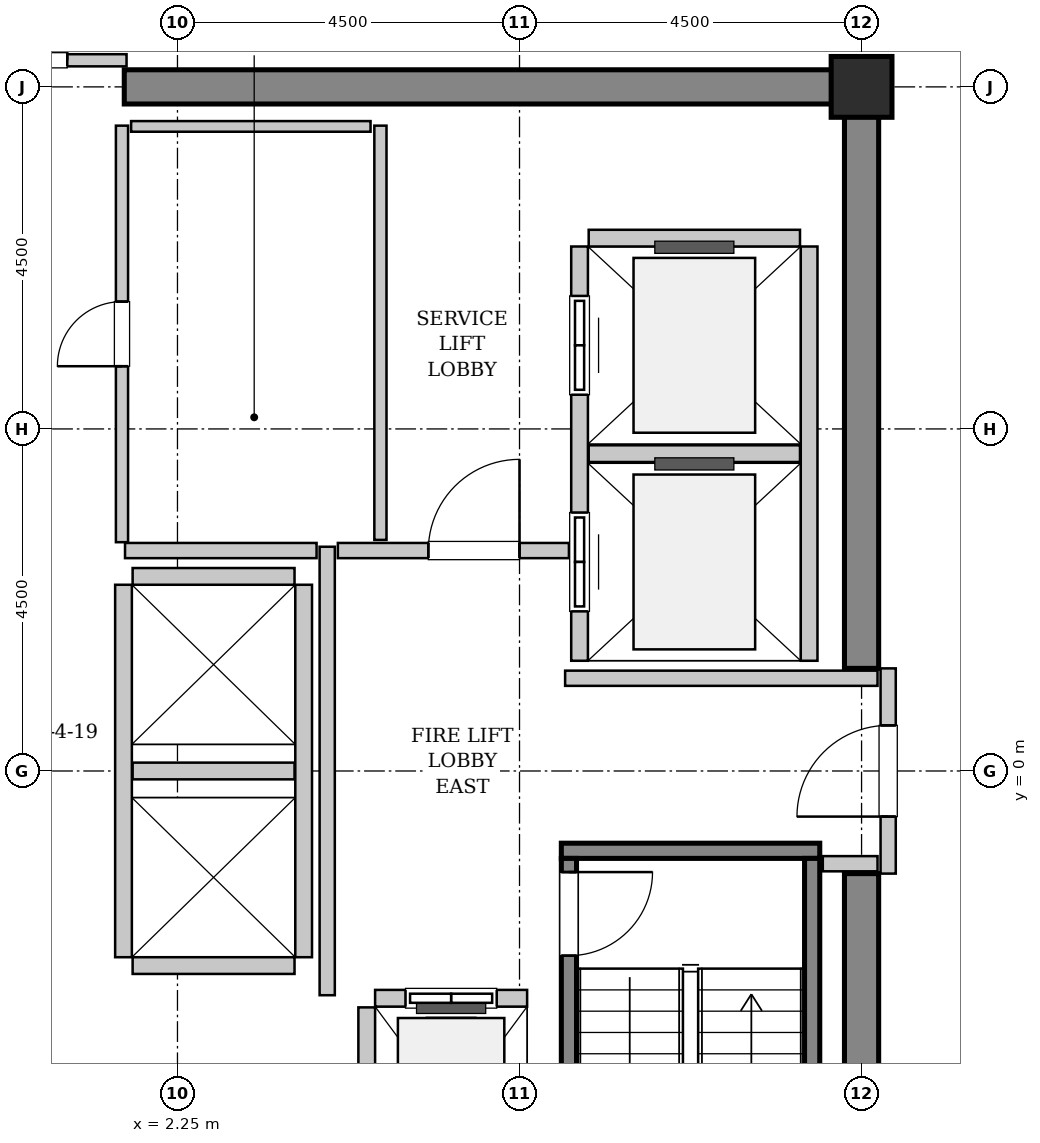
"""IFC4 building model, lengths in metres.
Left out: names, types, materials, properties, quantities, classifications, styles, units other than length and angle.
Written with IfcOpenShell. Run it as: python <this file> out.ifc"""

import sys

from ifc_helpers import new_model, si_unit, direction, frame, frame_2d, origin, origin_2d, place, context, subcontext, project, spatial, rectangle, hollow_rectangle, extrude, source, transform, mapped, element, fill, save


model = new_model("IFC4")
c1 = context("Model", 3, precision=1e-05, world=origin(), true_north=direction((0.0, 1.0)))
c2 = subcontext(c1, "Body", "Model", "MODEL_VIEW")
j1 = project(units=[si_unit("LENGTHUNIT", "METRE"), si_unit("PLANEANGLEUNIT", "RADIAN")], contexts=[c1])
p1 = place(None, origin())
s1 = spatial("IfcSite", under=j1, at=p1, CompositionType="ELEMENT")
p2 = place(p1, origin())
s2 = spatial("IfcBuilding", under=s1, at=p2, CompositionType="ELEMENT")
p3 = place(p2, frame((0.0, 0.0, 210.4)))
s3 = spatial("IfcBuildingStorey", under=s2, at=p3, CompositionType="ELEMENT", Elevation=210.4)
m1 = source(origin(), c2, "Body", "SweptSolid", [
    extrude(rectangle(XDim=9.925, YDim=0.45, at=frame_2d((4.962, 0.0))), origin(), (0.0, 0.0, 1.0), 3.8),
])
p4 = place(p3, frame((1.55, 9.0, 0.0), z_axis=(0.0, 0.0, 1.0), x_axis=(1.0, 0.0, 0.0)))
e1 = element("IfcWall", 1, at=p4, inside=s3, PredefinedType="SHEAR", context=c2, shape_type="MappedRepresentation", body=[
    mapped(m1, transform((0.0, 0.0, 0.0), x_axis=(1.0, 0.0, 0.0), y_axis=(0.0, 1.0, 0.0), z_axis=(0.0, 0.0, 1.0), scale=1.0)),
])
m2 = source(origin(), c2, "Body", "SweptSolid", [
    extrude(rectangle(XDim=7.425, YDim=0.45, at=frame_2d((3.712, 0.0))), origin(), (0.0, 0.0, 1.0), 3.8),
])
for number, where, z_axis, x_axis in (
    (2, (11.25, -8.775, 0.0), (0.0, 0.0, 1.0), (0.0, 1.0, 0.0)),
    (3, (11.25, 1.35, 0.0), (0.0, 0.0, 1.0), (0.0, 1.0, 0.0)),
):
    element("IfcWall", number, at=place(p3, frame(where, z_axis=z_axis, x_axis=x_axis)), inside=s3, PredefinedType="SHEAR", context=c2, shape_type="MappedRepresentation", body=[
        mapped(m2, transform((0.0, 0.0, 0.0), x_axis=(1.0, 0.0, 0.0), y_axis=(0.0, 1.0, 0.0), z_axis=(0.0, 0.0, 1.0), scale=1.0)),
    ])
m3 = source(origin(), c2, "Body", "SweptSolid", [
    extrude(hollow_rectangle(XDim=0.8, YDim=0.8, WallThickness=0.04, InnerFilletRadius=0.04, OuterFilletRadius=0.08, at=origin_2d()), origin(), (0.0, 0.0, 1.0), 3.8),
])
p5 = place(p3, frame((11.25, 9.0, 0.0), z_axis=(0.0, 0.0, 1.0), x_axis=(1.0, 0.0, 0.0)))
e4 = element("IfcColumn", 4, at=p5, inside=s3, PredefinedType="COLUMN", context=c2, shape_type="MappedRepresentation", body=[
    mapped(m3, transform((0.0, 0.0, 0.0), x_axis=(1.0, 0.0, 0.0), y_axis=(0.0, 1.0, 0.0), z_axis=(0.0, 0.0, 1.0), scale=1.0)),
])
m4 = source(origin(), c2, "Body", "SweptSolid", [
    extrude(rectangle(XDim=3.4, YDim=0.2, at=frame_2d((1.7, 0.0))), origin(), (0.0, 0.0, 1.0), 3.8),
])
p6 = place(p3, frame((7.3, -1.05, 0.0), z_axis=(0.0, 0.0, 1.0), x_axis=(1.0, 0.0, 0.0)))
e5 = element("IfcWall", 5, at=p6, inside=s3, PredefinedType="SOLIDWALL", context=c2, shape_type="MappedRepresentation", body=[
    mapped(m4, transform((0.0, 0.0, 0.0), x_axis=(1.0, 0.0, 0.0), y_axis=(0.0, 1.0, 0.0), z_axis=(0.0, 0.0, 1.0), scale=1.0)),
])
m5 = source(origin(), c2, "Body", "SweptSolid", [
    extrude(rectangle(XDim=7.1, YDim=0.2, at=frame_2d((3.55, 0.0))), origin(), (0.0, 0.0, 1.0), 3.8),
])
p7 = place(p3, frame((7.4, -1.15, 0.0), z_axis=(0.0, 0.0, 1.0), x_axis=(0.0, -1.0, 0.0)))
e6 = element("IfcWall", 6, at=p7, inside=s3, PredefinedType="SOLIDWALL", context=c2, shape_type="MappedRepresentation", body=[
    mapped(m5, transform((0.0, 0.0, 0.0), x_axis=(1.0, 0.0, 0.0), y_axis=(0.0, 1.0, 0.0), z_axis=(0.0, 0.0, 1.0), scale=1.0)),
])
p8 = place(p7, frame((0.18, 0.0, 0.0)))
e7 = element("IfcOpeningElement", 7, at=p8, cuts=e6, PredefinedType="OPENING", context=c2, shape_type="SweptSolid", body=[
    extrude(rectangle(XDim=1.1, YDim=2.15, at=frame_2d((0.55, 1.075))), frame((0.0, 0.11, 0.0), z_axis=(0.0, -1.0, 0.0), x_axis=(1.0, 0.0, 0.0)), (0.0, 0.0, 1.0), 0.22),
])
p9 = place(p3, frame((10.6, -1.15, 0.0), z_axis=(0.0, 0.0, 1.0), x_axis=(0.0, -1.0, 0.0)))
e8 = element("IfcWall", 8, at=p9, inside=s3, PredefinedType="SOLIDWALL", context=c2, shape_type="MappedRepresentation", body=[
    mapped(m5, transform((0.0, 0.0, 0.0), x_axis=(1.0, 0.0, 0.0), y_axis=(0.0, 1.0, 0.0), z_axis=(0.0, 0.0, 1.0), scale=1.0)),
])
m6 = source(origin(), c2, "Body", "SweptSolid", [
    extrude(rectangle(XDim=2.0, YDim=0.22, at=frame_2d((1.0, 0.0))), origin(), (0.0, 0.0, 1.0), 3.535),
])
p10 = place(p3, frame((6.85, -2.99, 0.0), z_axis=(0.0, 0.0, 1.0), x_axis=(-1.0, 0.0, 0.0)))
e9 = element("IfcWall", 9, at=p10, inside=s3, PredefinedType="SOLIDWALL", context=c2, shape_type="MappedRepresentation", body=[
    mapped(m6, transform((0.0, 0.0, 0.0), x_axis=(1.0, 0.0, 0.0), y_axis=(0.0, 1.0, 0.0), z_axis=(0.0, 0.0, 1.0), scale=1.0)),
])
p11 = place(p10, frame((0.4, 0.0, 0.0)))
e10 = element("IfcOpeningElement", 10, at=p11, cuts=e9, PredefinedType="OPENING", context=c2, shape_type="SweptSolid", body=[
    extrude(rectangle(XDim=1.2, YDim=2.2, at=frame_2d((0.6, 1.1))), frame((0.0, 0.12, 0.0), z_axis=(0.0, -1.0, 0.0), x_axis=(1.0, 0.0, 0.0)), (0.0, 0.0, 1.0), 0.24),
])
m7 = source(origin(), c2, "Body", "SweptSolid", [
    extrude(rectangle(XDim=2.68, YDim=0.22, at=frame_2d((1.34, 0.0))), origin(), (0.0, 0.0, 1.0), 3.535),
])
p12 = place(p3, frame((4.74, -3.11, 0.0), z_axis=(0.0, 0.0, 1.0), x_axis=(0.0, -1.0, 0.0)))
e11 = element("IfcWall", 11, at=p12, inside=s3, PredefinedType="SOLIDWALL", context=c2, shape_type="MappedRepresentation", body=[
    mapped(m7, transform((0.0, 0.0, 0.0), x_axis=(1.0, 0.0, 0.0), y_axis=(0.0, 1.0, 0.0), z_axis=(0.0, 0.0, 1.0), scale=1.0)),
])
m8 = source(origin(), c2, "Body", "SweptSolid", [
    extrude(rectangle(XDim=5.45, YDim=0.22, at=frame_2d((2.725, 0.0))), origin(), (0.0, 0.0, 1.0), 3.535),
])
p13 = place(p3, frame((7.54, 6.9, 0.0), z_axis=(0.0, 0.0, 1.0), x_axis=(0.0, -1.0, 0.0)))
e12 = element("IfcWall", 12, at=p13, inside=s3, PredefinedType="SOLIDWALL", context=c2, shape_type="MappedRepresentation", body=[
    mapped(m8, transform((0.0, 0.0, 0.0), x_axis=(1.0, 0.0, 0.0), y_axis=(0.0, 1.0, 0.0), z_axis=(0.0, 0.0, 1.0), scale=1.0)),
])
p14 = place(p13, frame((3.5, 0.0, 0.0)))
e13 = element("IfcOpeningElement", 13, at=p14, cuts=e12, PredefinedType="OPENING", context=c2, shape_type="SweptSolid", body=[
    extrude(rectangle(XDim=1.3, YDim=2.3, at=frame_2d((0.65, 1.15))), frame((0.0, 0.12, 0.0), z_axis=(0.0, -1.0, 0.0), x_axis=(1.0, 0.0, 0.0)), (0.0, 0.0, 1.0), 0.24),
])
p15 = place(p13, frame((0.65, 0.0, 0.0)))
e14 = element("IfcOpeningElement", 14, at=p15, cuts=e12, PredefinedType="OPENING", context=c2, shape_type="SweptSolid", body=[
    extrude(rectangle(XDim=1.3, YDim=2.3, at=frame_2d((0.65, 1.15))), frame((0.0, 0.12, 0.0), z_axis=(0.0, -1.0, 0.0), x_axis=(1.0, 0.0, 0.0)), (0.0, 0.0, 1.0), 0.24),
])
p16 = place(p3, frame((10.56, 1.45, 0.0), z_axis=(0.0, 0.0, 1.0), x_axis=(0.0, 1.0, 0.0)))
e15 = element("IfcWall", 15, at=p16, inside=s3, PredefinedType="SOLIDWALL", context=c2, shape_type="MappedRepresentation", body=[
    mapped(m8, transform((0.0, 0.0, 0.0), x_axis=(1.0, 0.0, 0.0), y_axis=(0.0, 1.0, 0.0), z_axis=(0.0, 0.0, 1.0), scale=1.0)),
])
m9 = source(origin(), c2, "Body", "SweptSolid", [
    extrude(rectangle(XDim=2.78, YDim=0.22, at=frame_2d((1.39, 0.0))), origin(), (0.0, 0.0, 1.0), 3.535),
])
for number, where, z_axis, x_axis in (
    (16, (7.66, 4.175, 0.0), (0.0, 0.0, 1.0), (1.0, 0.0, 0.0)),
    (17, (10.44, 7.01, 0.0), (0.0, 0.0, 1.0), (-1.0, 0.0, 0.0)),
):
    element("IfcWall", number, at=place(p3, frame(where, z_axis=z_axis, x_axis=x_axis)), inside=s3, PredefinedType="SOLIDWALL", context=c2, shape_type="MappedRepresentation", body=[
        mapped(m9, transform((0.0, 0.0, 0.0), x_axis=(1.0, 0.0, 0.0), y_axis=(0.0, 1.0, 0.0), z_axis=(0.0, 0.0, 1.0), scale=1.0)),
    ])
m10 = source(origin(), c2, "Body", "SweptSolid", [
    extrude(rectangle(XDim=4.9, YDim=0.22, at=frame_2d((2.45, 0.0))), origin(), (0.0, 0.0, 1.0), 3.535),
])
for number, where, z_axis, x_axis in (
    (18, (1.54, 2.45, 0.0), (0.0, 0.0, 1.0), (0.0, -1.0, 0.0)),
    (19, (3.91, -2.45, 0.0), (0.0, 0.0, 1.0), (0.0, 1.0, 0.0)),
):
    element("IfcWall", number, at=place(p3, frame(where, z_axis=z_axis, x_axis=x_axis)), inside=s3, PredefinedType="SOLIDWALL", context=c2, shape_type="MappedRepresentation", body=[
        mapped(m10, transform((0.0, 0.0, 0.0), x_axis=(1.0, 0.0, 0.0), y_axis=(0.0, 1.0, 0.0), z_axis=(0.0, 0.0, 1.0), scale=1.0)),
    ])
m11 = source(origin(), c2, "Body", "SweptSolid", [
    extrude(rectangle(XDim=2.13, YDim=0.22, at=frame_2d((1.065, 0.0))), origin(), (0.0, 0.0, 1.0), 3.535),
])
for number, where, z_axis, x_axis in (
    (20, (1.66, -2.56, 0.0), (0.0, 0.0, 1.0), (1.0, 0.0, 0.0)),
    (21, (1.66, 0.0, 0.0), (0.0, 0.0, 1.0), (1.0, 0.0, 0.0)),
    (22, (3.79, 2.56, 0.0), (0.0, 0.0, 1.0), (-1.0, 0.0, 0.0)),
):
    element("IfcWall", number, at=place(p3, frame(where, z_axis=z_axis, x_axis=x_axis)), inside=s3, PredefinedType="SOLIDWALL", context=c2, shape_type="MappedRepresentation", body=[
        mapped(m11, transform((0.0, 0.0, 0.0), x_axis=(1.0, 0.0, 0.0), y_axis=(0.0, 1.0, 0.0), z_axis=(0.0, 0.0, 1.0), scale=1.0)),
    ])
m12 = source(origin(), c2, "Body", "SweptSolid", [
    extrude(rectangle(XDim=2.7, YDim=0.2, at=frame_2d((1.35, 0.0))), origin(), (0.0, 0.0, 1.0), 2.625),
])
p17 = place(p3, frame((11.6, -1.35, 0.0), z_axis=(0.0, 0.0, 1.0), x_axis=(0.0, 1.0, 0.0)))
e23 = element("IfcWall", 23, at=p17, inside=s3, PredefinedType="PARTITIONING", context=c2, shape_type="MappedRepresentation", body=[
    mapped(m12, transform((0.0, 0.0, 0.0), x_axis=(1.0, 0.0, 0.0), y_axis=(0.0, 1.0, 0.0), z_axis=(0.0, 0.0, 1.0), scale=1.0)),
])
p18 = place(p17, frame((0.75, 0.0, 0.0)))
e24 = element("IfcOpeningElement", 24, at=p18, cuts=e23, PredefinedType="OPENING", context=c2, shape_type="SweptSolid", body=[
    extrude(rectangle(XDim=1.2, YDim=2.15, at=frame_2d((0.6, 1.075))), frame((0.0, 0.11, 0.0), z_axis=(0.0, -1.0, 0.0), x_axis=(1.0, 0.0, 0.0)), (0.0, 0.0, 1.0), 0.22),
])
m13 = source(origin(), c2, "Body", "SweptSolid", [
    extrude(rectangle(XDim=5.9, YDim=0.2, at=frame_2d((2.95, 0.0))), origin(), (0.0, 0.0, 1.0), 3.535),
])
p19 = place(p3, frame((4.22, -2.95, 0.0), z_axis=(0.0, 0.0, 1.0), x_axis=(0.0, 1.0, 0.0)))
e25 = element("IfcWall", 25, at=p19, inside=s3, PredefinedType="PARTITIONING", context=c2, shape_type="MappedRepresentation", body=[
    mapped(m13, transform((0.0, 0.0, 0.0), x_axis=(1.0, 0.0, 0.0), y_axis=(0.0, 1.0, 0.0), z_axis=(0.0, 0.0, 1.0), scale=1.0)),
])
m14 = source(origin(), c2, "Body", "SweptSolid", [
    extrude(rectangle(XDim=2.52, YDim=0.2, at=frame_2d((1.26, 0.0))), origin(), (0.0, 0.0, 1.0), 3.535),
])
p20 = place(p3, frame((1.56, 2.9, 0.0), z_axis=(0.0, 0.0, 1.0), x_axis=(1.0, 0.0, 0.0)))
e26 = element("IfcWall", 26, at=p20, inside=s3, PredefinedType="PARTITIONING", context=c2, shape_type="MappedRepresentation", body=[
    mapped(m14, transform((0.0, 0.0, 0.0), x_axis=(1.0, 0.0, 0.0), y_axis=(0.0, 1.0, 0.0), z_axis=(0.0, 0.0, 1.0), scale=1.0)),
])
m15 = source(origin(), c2, "Body", "SweptSolid", [
    extrude(rectangle(XDim=3.04, YDim=0.2, at=frame_2d((1.52, 0.0))), origin(), (0.0, 0.0, 1.0), 3.535),
])
p21 = place(p3, frame((4.36, 2.9, 0.0), z_axis=(0.0, 0.0, 1.0), x_axis=(1.0, 0.0, 0.0)))
e27 = element("IfcWall", 27, at=p21, inside=s3, PredefinedType="PARTITIONING", context=c2, shape_type="MappedRepresentation", body=[
    mapped(m15, transform((0.0, 0.0, 0.0), x_axis=(1.0, 0.0, 0.0), y_axis=(0.0, 1.0, 0.0), z_axis=(0.0, 0.0, 1.0), scale=1.0)),
])
p22 = place(p21, frame((1.19, 0.0, 0.0)))
e28 = element("IfcOpeningElement", 28, at=p22, cuts=e27, PredefinedType="OPENING", context=c2, shape_type="SweptSolid", body=[
    extrude(rectangle(XDim=1.2, YDim=2.15, at=frame_2d((0.6, 1.075))), frame((0.0, 0.11, 0.0), z_axis=(0.0, -1.0, 0.0), x_axis=(1.0, 0.0, 0.0)), (0.0, 0.0, 1.0), 0.22),
])
m16 = source(origin(), c2, "Body", "SweptSolid", [
    extrude(rectangle(XDim=4.11, YDim=0.2, at=frame_2d((2.055, 0.0))), origin(), (0.0, 0.0, 1.0), 3.535),
])
p23 = place(p3, frame((7.35, 1.22, 0.0), z_axis=(0.0, 0.0, 1.0), x_axis=(1.0, 0.0, 0.0)))
e29 = element("IfcWall", 29, at=p23, inside=s3, PredefinedType="PARTITIONING", context=c2, shape_type="MappedRepresentation", body=[
    mapped(m16, transform((0.0, 0.0, 0.0), x_axis=(1.0, 0.0, 0.0), y_axis=(0.0, 1.0, 0.0), z_axis=(0.0, 0.0, 1.0), scale=1.0)),
])
m17 = source(origin(), c2, "Body", "SweptSolid", [
    extrude(rectangle(XDim=0.72, YDim=0.2, at=frame_2d((0.36, 0.0))), origin(), (0.0, 0.0, 1.0), 3.535),
])
p24 = place(p3, frame((10.74, -1.22, 0.0), z_axis=(0.0, 0.0, 1.0), x_axis=(1.0, 0.0, 0.0)))
e30 = element("IfcWall", 30, at=p24, inside=s3, PredefinedType="PARTITIONING", context=c2, shape_type="MappedRepresentation", body=[
    mapped(m17, transform((0.0, 0.0, 0.0), x_axis=(1.0, 0.0, 0.0), y_axis=(0.0, 1.0, 0.0), z_axis=(0.0, 0.0, 1.0), scale=1.0)),
])
m18 = source(origin(), c2, "Body", "SweptSolid", [
    extrude(rectangle(XDim=3.16, YDim=0.16, at=frame_2d((1.58, 0.0))), origin(), (0.0, 0.0, 1.0), 2.625),
])
p25 = place(p3, frame((-1.58, 9.35, 0.0), z_axis=(0.0, 0.0, 1.0), x_axis=(1.0, 0.0, 0.0)))
e31 = element("IfcWall", 31, at=p25, inside=s3, PredefinedType="PARTITIONING", context=c2, shape_type="MappedRepresentation", body=[
    mapped(m18, transform((0.0, 0.0, 0.0), x_axis=(1.0, 0.0, 0.0), y_axis=(0.0, 1.0, 0.0), z_axis=(0.0, 0.0, 1.0), scale=1.0)),
])
p26 = place(p25, frame((0.78, 0.0, 0.0)))
e32 = element("IfcOpeningElement", 32, at=p26, cuts=e31, PredefinedType="OPENING", context=c2, shape_type="SweptSolid", body=[
    extrude(rectangle(XDim=1.6, YDim=2.3, at=frame_2d((0.8, 1.15))), frame((0.0, 0.09, 0.0), z_axis=(0.0, -1.0, 0.0), x_axis=(1.0, 0.0, 0.0)), (0.0, 0.0, 1.0), 0.18),
])
m19 = source(origin(), c2, "Body", "SweptSolid", [
    extrude(rectangle(XDim=5.45, YDim=0.16, at=frame_2d((2.725, 0.0))), origin(), (0.0, 0.0, 1.0), 3.535),
])
p27 = place(p3, frame((4.92, 3.04, 0.0), z_axis=(0.0, 0.0, 1.0), x_axis=(0.0, 1.0, 0.0)))
e33 = element("IfcWall", 33, at=p27, inside=s3, PredefinedType="PARTITIONING", context=c2, shape_type="MappedRepresentation", body=[
    mapped(m19, transform((0.0, 0.0, 0.0), x_axis=(1.0, 0.0, 0.0), y_axis=(0.0, 1.0, 0.0), z_axis=(0.0, 0.0, 1.0), scale=1.0)),
])
m20 = source(origin(), c2, "Body", "SweptSolid", [
    extrude(rectangle(XDim=5.48, YDim=0.16, at=frame_2d((2.74, 0.0))), origin(), (0.0, 0.0, 1.0), 3.535),
])
p28 = place(p3, frame((1.52, 3.01, 0.0), z_axis=(0.0, 0.0, 1.0), x_axis=(0.0, 1.0, 0.0)))
e34 = element("IfcWall", 34, at=p28, inside=s3, PredefinedType="PARTITIONING", context=c2, shape_type="MappedRepresentation", body=[
    mapped(m20, transform((0.0, 0.0, 0.0), x_axis=(1.0, 0.0, 0.0), y_axis=(0.0, 1.0, 0.0), z_axis=(0.0, 0.0, 1.0), scale=1.0)),
])
p29 = place(p28, frame((2.315, 0.0, 0.0)))
e35 = element("IfcOpeningElement", 35, at=p29, cuts=e34, PredefinedType="OPENING", context=c2, shape_type="SweptSolid", body=[
    extrude(rectangle(XDim=0.85, YDim=2.1, at=frame_2d((0.425, 1.05))), frame((0.0, 0.09, 0.0), z_axis=(0.0, -1.0, 0.0), x_axis=(1.0, 0.0, 0.0)), (0.0, 0.0, 1.0), 0.18),
])
m21 = source(origin(), c2, "Body", "SweptSolid", [
    extrude(rectangle(XDim=3.15, YDim=0.14, at=frame_2d((1.575, 0.0))), origin(), (0.0, 0.0, 1.0), 3.535),
])
p30 = place(p3, frame((1.64, 8.48, 0.0), z_axis=(0.0, 0.0, 1.0), x_axis=(1.0, 0.0, 0.0)))
e36 = element("IfcWall", 36, at=p30, inside=s3, PredefinedType="PARTITIONING", context=c2, shape_type="MappedRepresentation", body=[
    mapped(m21, transform((0.0, 0.0, 0.0), x_axis=(1.0, 0.0, 0.0), y_axis=(0.0, 1.0, 0.0), z_axis=(0.0, 0.0, 1.0), scale=1.0)),
])
m22 = source(origin(), c2, "Body", "SweptSolid", [
    extrude(rectangle(XDim=1.1, YDim=2.15, at=frame_2d((0.55, 1.075))), frame((0.0, 0.025, 0.0), z_axis=(0.0, -1.0, 0.0), x_axis=(1.0, 0.0, 0.0)), (0.0, 0.0, 1.0), 0.05),
])
p31 = place(p8, origin())
e37 = element("IfcDoor", 37, at=p31, inside=s3, OperationType="SINGLE_SWING_LEFT", PredefinedType="DOOR", context=c2, shape_type="MappedRepresentation", body=[
    mapped(m22, transform((0.0, 0.0, 0.0), x_axis=(1.0, 0.0, 0.0), y_axis=(0.0, 1.0, 0.0), z_axis=(0.0, 0.0, 1.0), scale=1.0)),
])
fill(e7, e37)
m23 = source(origin(), c2, "Body", "SweptSolid", [
    extrude(rectangle(XDim=1.2, YDim=2.2, at=frame_2d((0.6, 1.1))), frame((0.0, 0.025, 0.0), z_axis=(0.0, -1.0, 0.0), x_axis=(1.0, 0.0, 0.0)), (0.0, 0.0, 1.0), 0.05),
])
p32 = place(p11, origin())
e38 = element("IfcDoor", 38, at=p32, inside=s3, OperationType="SLIDING_TO_LEFT", PredefinedType="DOOR", context=c2, shape_type="MappedRepresentation", body=[
    mapped(m23, transform((0.0, 0.0, 0.0), x_axis=(1.0, 0.0, 0.0), y_axis=(0.0, 1.0, 0.0), z_axis=(0.0, 0.0, 1.0), scale=1.0)),
])
fill(e10, e38)
m24 = source(origin(), c2, "Body", "SweptSolid", [
    extrude(rectangle(XDim=1.3, YDim=2.3, at=frame_2d((0.65, 1.15))), frame((0.0, 0.025, 0.0), z_axis=(0.0, -1.0, 0.0), x_axis=(1.0, 0.0, 0.0)), (0.0, 0.0, 1.0), 0.05),
])
p33 = place(p14, origin())
e39 = element("IfcDoor", 39, at=p33, inside=s3, OperationType="SLIDING_TO_RIGHT", PredefinedType="DOOR", context=c2, shape_type="MappedRepresentation", body=[
    mapped(m24, transform((0.0, 0.0, 0.0), x_axis=(1.0, 0.0, 0.0), y_axis=(0.0, 1.0, 0.0), z_axis=(0.0, 0.0, 1.0), scale=1.0)),
])
fill(e13, e39)
p34 = place(p15, origin())
e40 = element("IfcDoor", 40, at=p34, inside=s3, OperationType="SLIDING_TO_RIGHT", PredefinedType="DOOR", context=c2, shape_type="MappedRepresentation", body=[
    mapped(m24, transform((0.0, 0.0, 0.0), x_axis=(1.0, 0.0, 0.0), y_axis=(0.0, 1.0, 0.0), z_axis=(0.0, 0.0, 1.0), scale=1.0)),
])
fill(e14, e40)
m25 = source(origin(), c2, "Body", "SweptSolid", [
    extrude(rectangle(XDim=1.2, YDim=2.15, at=frame_2d((0.6, 1.075))), frame((0.0, 0.025, 0.0), z_axis=(0.0, -1.0, 0.0), x_axis=(1.0, 0.0, 0.0)), (0.0, 0.0, 1.0), 0.05),
])
p35 = place(p18, origin())
e41 = element("IfcDoor", 41, at=p35, inside=s3, OperationType="SINGLE_SWING_LEFT", PredefinedType="DOOR", context=c2, shape_type="MappedRepresentation", body=[
    mapped(m25, transform((0.0, 0.0, 0.0), x_axis=(1.0, 0.0, 0.0), y_axis=(0.0, 1.0, 0.0), z_axis=(0.0, 0.0, 1.0), scale=1.0)),
])
fill(e24, e41)
p36 = place(p22, origin())
e42 = element("IfcDoor", 42, at=p36, inside=s3, OperationType="SINGLE_SWING_RIGHT", PredefinedType="DOOR", context=c2, shape_type="MappedRepresentation", body=[
    mapped(m25, transform((0.0, 0.0, 0.0), x_axis=(1.0, 0.0, 0.0), y_axis=(0.0, 1.0, 0.0), z_axis=(0.0, 0.0, 1.0), scale=1.0)),
])
fill(e28, e42)
m26 = source(origin(), c2, "Body", "SweptSolid", [
    extrude(rectangle(XDim=1.6, YDim=2.3, at=frame_2d((0.8, 1.15))), frame((0.0, 0.025, 0.0), z_axis=(0.0, -1.0, 0.0), x_axis=(1.0, 0.0, 0.0)), (0.0, 0.0, 1.0), 0.05),
])
p37 = place(p26, origin())
e43 = element("IfcDoor", 43, at=p37, inside=s3, OperationType="DOUBLE_DOOR_SINGLE_SWING", PredefinedType="DOOR", context=c2, shape_type="MappedRepresentation", body=[
    mapped(m26, transform((0.0, 0.0, 0.0), x_axis=(1.0, 0.0, 0.0), y_axis=(0.0, 1.0, 0.0), z_axis=(0.0, 0.0, 1.0), scale=1.0)),
])
fill(e32, e43)
m27 = source(origin(), c2, "Body", "SweptSolid", [
    extrude(rectangle(XDim=0.85, YDim=2.1, at=frame_2d((0.425, 1.05))), frame((0.0, 0.025, 0.0), z_axis=(0.0, -1.0, 0.0), x_axis=(1.0, 0.0, 0.0)), (0.0, 0.0, 1.0), 0.05),
])
p38 = place(p29, origin())
e44 = element("IfcDoor", 44, at=p38, inside=s3, OperationType="SINGLE_SWING_LEFT", PredefinedType="DOOR", context=c2, shape_type="MappedRepresentation", body=[
    mapped(m27, transform((0.0, 0.0, 0.0), x_axis=(1.0, 0.0, 0.0), y_axis=(0.0, 1.0, 0.0), z_axis=(0.0, 0.0, 1.0), scale=1.0)),
])
fill(e35, e44)
save(model, sys.argv[1])
